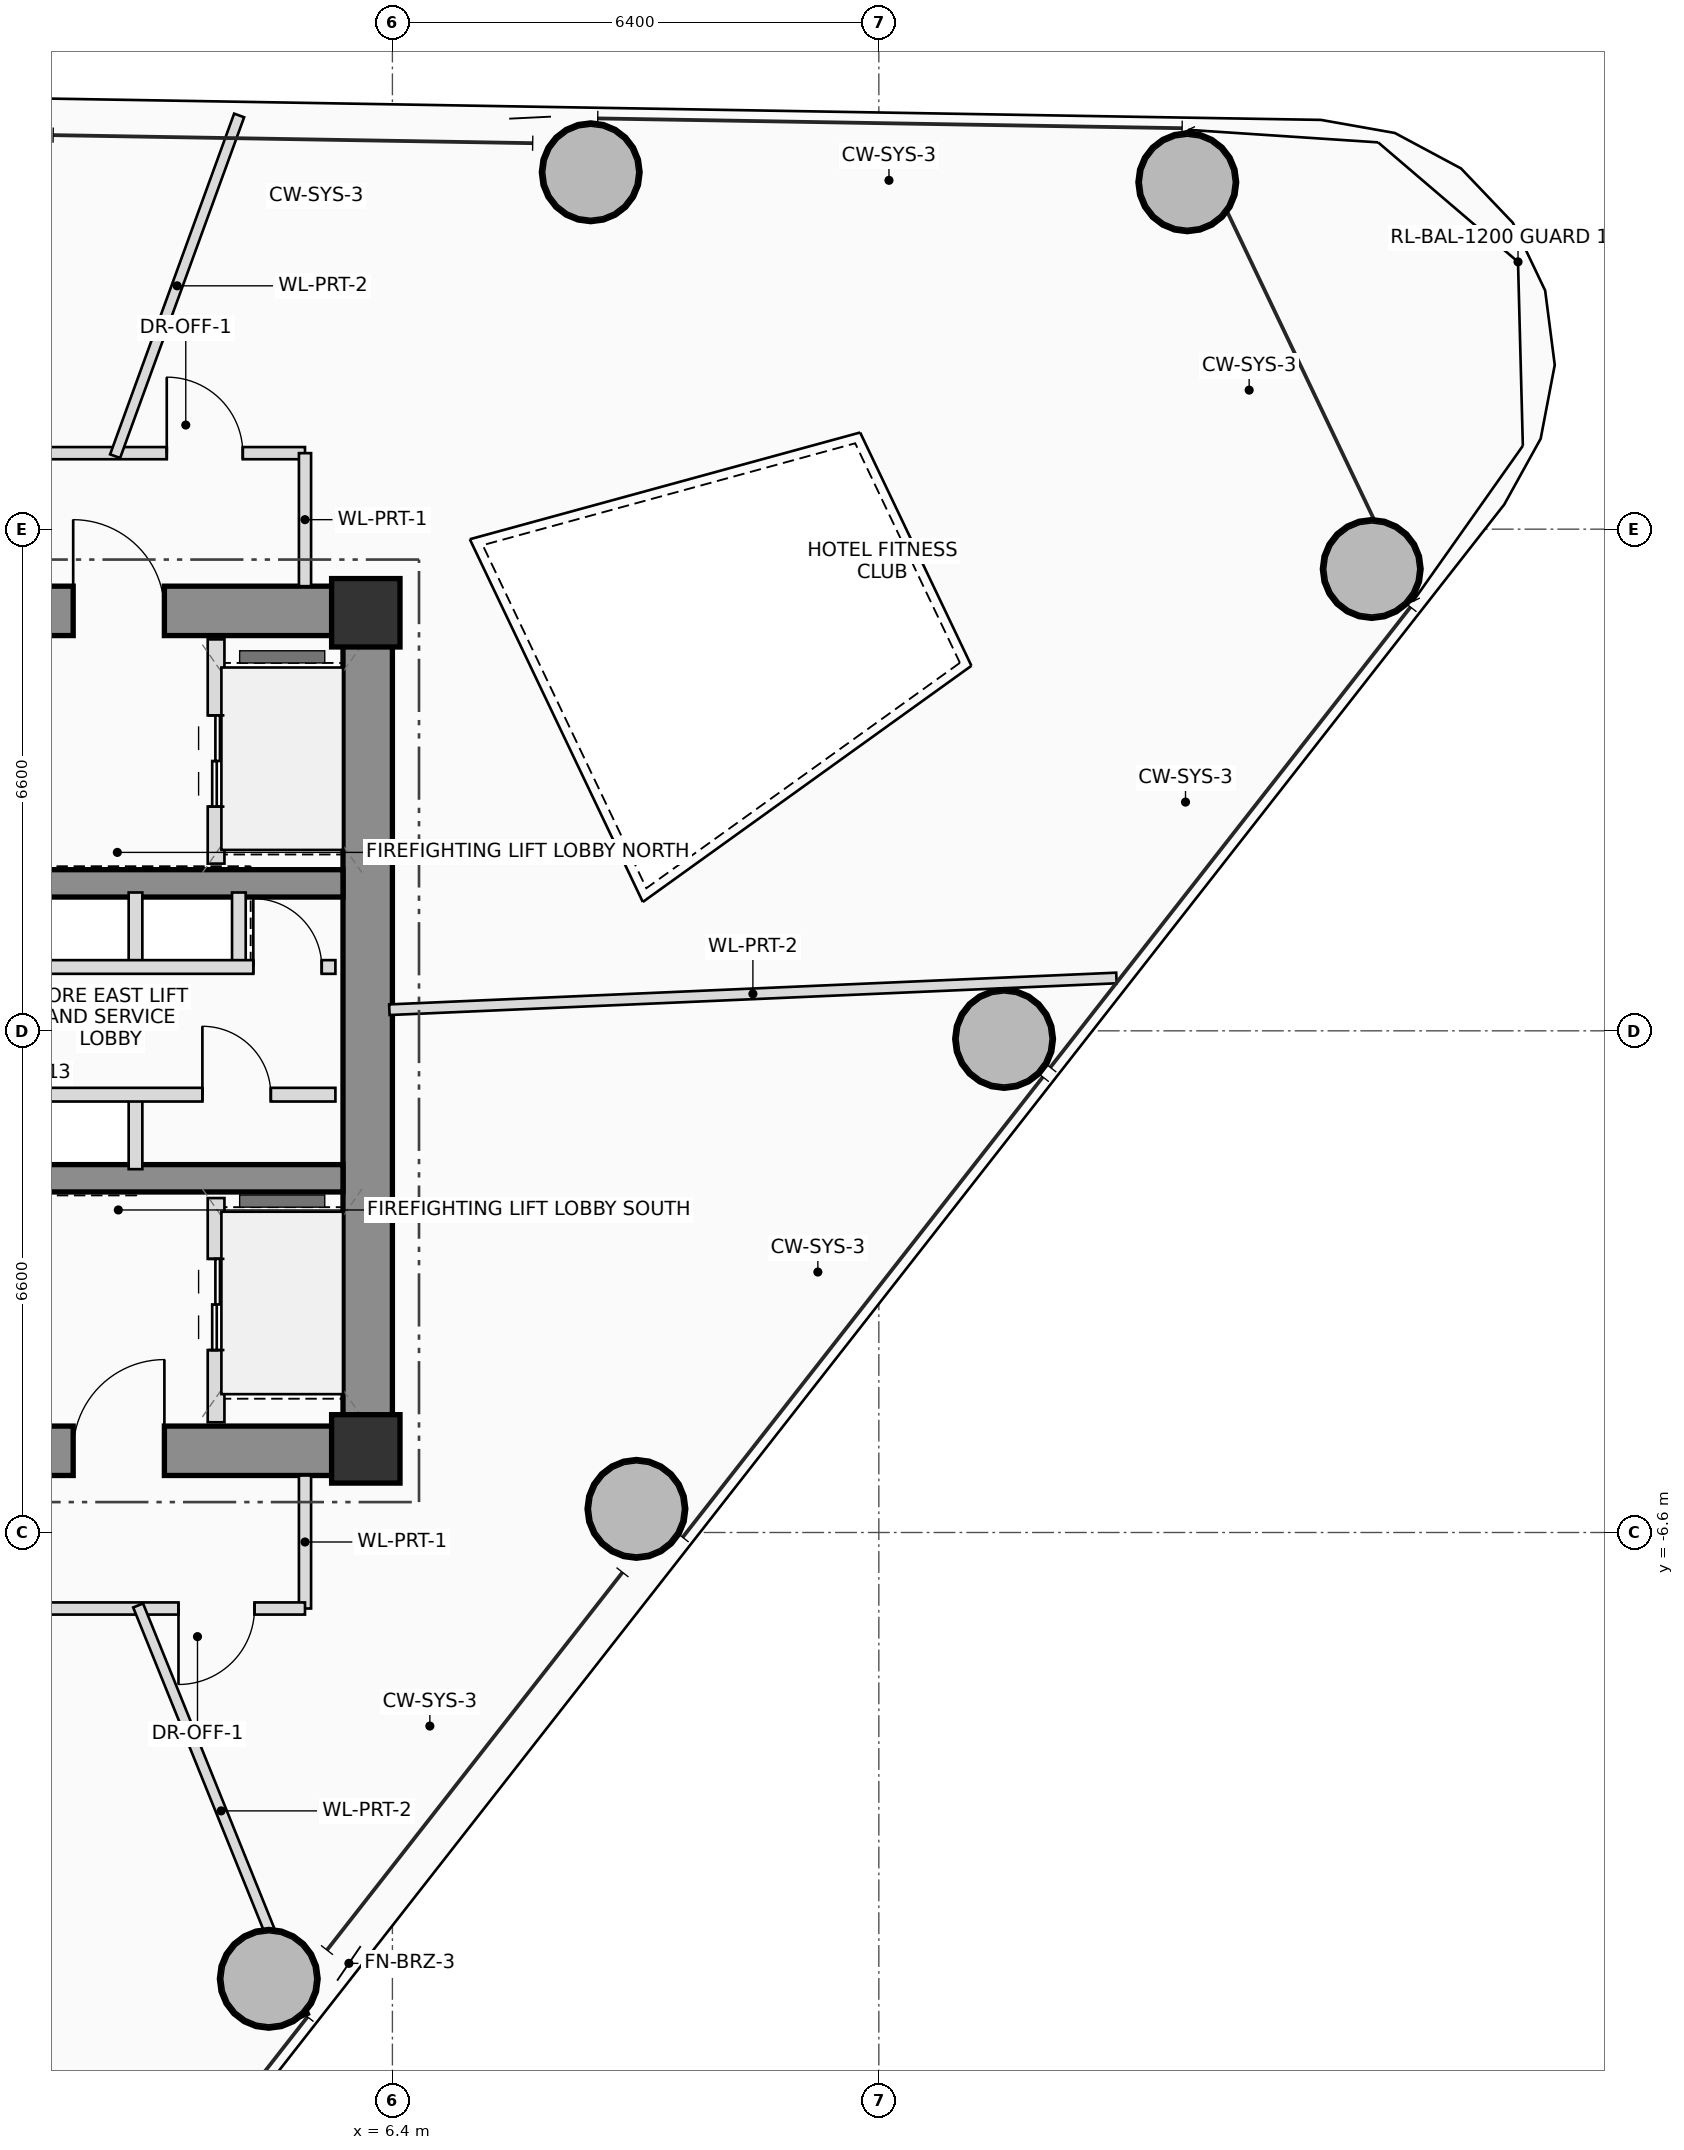
"""IFC4 building model, lengths in metres.
Left out: names, types, materials, properties, quantities, classifications, styles, units other than length and angle.
Written with IfcOpenShell. Run it as: python <this file> out.ifc"""

import sys

from ifc_helpers import new_model, si_unit, direction, frame, frame_2d, origin, origin_2d, place, context, subcontext, project, spatial, rectangle, hollow_circle, extrude, source, transform, mapped, element, fill, save


model = new_model("IFC4")
c1 = context("Model", 3, precision=1e-05, world=origin(), true_north=direction((0.0, 1.0)))
c2 = subcontext(c1, "Body", "Model", "MODEL_VIEW")
j1 = project(units=[si_unit("LENGTHUNIT", "METRE"), si_unit("PLANEANGLEUNIT", "RADIAN")], contexts=[c1])
p1 = place(None, origin())
s1 = spatial("IfcSite", under=j1, at=p1, CompositionType="ELEMENT")
p2 = place(p1, origin())
s2 = spatial("IfcBuilding", under=s1, at=p2, CompositionType="ELEMENT")
p3 = place(p2, frame((0.0, 0.0, 143.3)))
s3 = spatial("IfcBuildingStorey", under=s2, at=p3, CompositionType="ELEMENT", Elevation=143.3)
m1 = source(origin(), c2, "Body", "SweptSolid", [
    extrude(rectangle(XDim=0.9, YDim=0.9, at=origin_2d()), origin(), (0.0, 0.0, 1.0), 3.45),
])
for number, where, z_axis, x_axis in (
    (1, (6.05, -5.5, 0.0), (0.0, 0.0, 1.0), (1.0, 0.0, 0.0)),
    (2, (6.05, 5.5, 0.0), (0.0, 0.0, 1.0), (1.0, 0.0, 0.0)),
):
    element("IfcColumn", number, at=place(p3, frame(where, z_axis=z_axis, x_axis=x_axis)), inside=s3, PredefinedType="COLUMN", context=c2, shape_type="MappedRepresentation", body=[
        mapped(m1, transform((0.0, 0.0, 0.0), scale=1.0)),
    ])
p4 = place(p3, frame((-6.4, 5.525, 0.0), z_axis=(0.0, 0.0, 1.0), x_axis=(1.0, 0.0, 0.0)))
e3 = element("IfcWall", 3, at=p4, inside=s3, PredefinedType="SHEAR", context=c2, shape_type="SweptSolid", body=[
    extrude(rectangle(XDim=12.8, YDim=0.65, at=frame_2d((6.4, 0.0))), origin(), (0.0, 0.0, 1.0), 3.45),
])
p5 = place(p4, frame((8.6, 0.0, 0.0)))
e4 = element("IfcOpeningElement", 4, at=p5, cuts=e3, PredefinedType="OPENING", context=c2, shape_type="SweptSolid", body=[
    extrude(rectangle(XDim=1.2, YDim=2.2, at=frame_2d((0.6, 1.1))), frame((0.0, 0.335, 0.0), z_axis=(0.0, -1.0, 0.0), x_axis=(1.0, 0.0, 0.0)), (0.0, 0.0, 1.0), 0.67),
])
p6 = place(p3, frame((-6.4, -5.525, 0.0), z_axis=(0.0, 0.0, 1.0), x_axis=(1.0, 0.0, 0.0)))
e5 = element("IfcWall", 5, at=p6, inside=s3, PredefinedType="SHEAR", context=c2, shape_type="SweptSolid", body=[
    extrude(rectangle(XDim=12.8, YDim=0.65, at=frame_2d((6.4, 0.0))), origin(), (0.0, 0.0, 1.0), 3.45),
])
p7 = place(p6, frame((8.6, 0.0, 0.0)))
e6 = element("IfcOpeningElement", 6, at=p7, cuts=e5, PredefinedType="OPENING", context=c2, shape_type="SweptSolid", body=[
    extrude(rectangle(XDim=1.2, YDim=2.2, at=frame_2d((0.6, 1.1))), frame((0.0, 0.335, 0.0), z_axis=(0.0, -1.0, 0.0), x_axis=(1.0, 0.0, 0.0)), (0.0, 0.0, 1.0), 0.67),
])
p8 = place(p3, frame((6.075, -5.2, 0.0), z_axis=(0.0, 0.0, 1.0), x_axis=(0.0, 1.0, 0.0)))
e7 = element("IfcWall", 7, at=p8, inside=s3, PredefinedType="SHEAR", context=c2, shape_type="SweptSolid", body=[
    extrude(rectangle(XDim=10.4, YDim=0.65, at=frame_2d((5.2, 0.0))), origin(), (0.0, 0.0, 1.0), 3.45),
])
for number, where, z_axis, x_axis in (
    (8, (-5.75, 1.94, 0.0), (0.0, 0.0, 1.0), (1.0, 0.0, 0.0)),
    (9, (-5.75, -1.94, 0.0), (0.0, 0.0, 1.0), (1.0, 0.0, 0.0)),
):
    element("IfcWall", number, at=place(p3, frame(where, z_axis=z_axis, x_axis=x_axis)), inside=s3, PredefinedType="SHEAR", context=c2, shape_type="SweptSolid", body=[
        extrude(rectangle(XDim=11.5, YDim=0.36, at=frame_2d((5.75, 0.0))), origin(), (0.0, 0.0, 1.0), 3.45),
    ])
m2 = source(origin(), c2, "Body", "SweptSolid", [
    extrude(hollow_circle(Radius=0.65, WallThickness=0.045, at=origin_2d()), origin(), (0.0, 0.0, 1.0), 3.45),
])
for number, where, z_axis, x_axis in (
    (10, (4.773, -12.472, 0.0), (0.0, 0.0, 1.0), (1.0, 0.0, 0.0)),
    (11, (9.611, -6.289, 0.0), (0.0, 0.0, 1.0), (1.0, 0.0, 0.0)),
    (12, (14.448, -0.107, 0.0), (0.0, 0.0, 1.0), (1.0, 0.0, 0.0)),
    (13, (19.285, 6.076, 0.0), (0.0, 0.0, 1.0), (1.0, 0.0, 0.0)),
    (14, (16.858, 11.164, 0.0), (0.0, 0.0, 1.0), (1.0, 0.0, 0.0)),
    (15, (9.01, 11.295, 0.0), (0.0, 0.0, 1.0), (1.0, 0.0, 0.0)),
):
    element("IfcColumn", number, at=place(p3, frame(where, z_axis=z_axis, x_axis=x_axis)), inside=s3, PredefinedType="COLUMN", context=c2, shape_type="MappedRepresentation", body=[
        mapped(m2, transform((0.0, 0.0, 0.0), scale=1.0)),
    ])
p9 = place(p3, frame((4.08, 2.2, 0.0), z_axis=(0.0, 0.0, 1.0), x_axis=(0.0, 1.0, 0.0)))
e16 = element("IfcWall", 16, at=p9, inside=s3, PredefinedType="PLUMBINGWALL", context=c2, shape_type="SweptSolid", body=[
    extrude(rectangle(XDim=2.95, YDim=0.22, at=frame_2d((1.475, 0.0))), origin(), (0.0, 0.0, 1.0), 3.25),
])
p10 = place(p9, frame((0.75, 0.0, 0.0)))
e17 = element("IfcOpeningElement", 17, at=p10, cuts=e16, PredefinedType="OPENING", context=c2, shape_type="SweptSolid", body=[
    extrude(rectangle(XDim=1.2, YDim=2.25, at=frame_2d((0.6, 1.125))), frame((0.0, 0.12, 0.0), z_axis=(0.0, -1.0, 0.0), x_axis=(1.0, 0.0, 0.0)), (0.0, 0.0, 1.0), 0.24),
])
p11 = place(p3, frame((4.08, -5.15, 0.0), z_axis=(0.0, 0.0, 1.0), x_axis=(0.0, 1.0, 0.0)))
e18 = element("IfcWall", 18, at=p11, inside=s3, PredefinedType="PLUMBINGWALL", context=c2, shape_type="SweptSolid", body=[
    extrude(rectangle(XDim=2.95, YDim=0.22, at=frame_2d((1.475, 0.0))), origin(), (0.0, 0.0, 1.0), 3.25),
])
p12 = place(p11, frame((0.95, 0.0, 0.0)))
e19 = element("IfcOpeningElement", 19, at=p12, cuts=e18, PredefinedType="OPENING", context=c2, shape_type="SweptSolid", body=[
    extrude(rectangle(XDim=1.2, YDim=2.25, at=frame_2d((0.6, 1.125))), frame((0.0, 0.12, 0.0), z_axis=(0.0, -1.0, 0.0), x_axis=(1.0, 0.0, 0.0)), (0.0, 0.0, 1.0), 0.24),
])
for number, where, z_axis, x_axis in (
    (20, (3.02, 0.84, 0.0), (0.0, 0.0, 1.0), (0.0, 1.0, 0.0)),
    (21, (4.38, 0.84, 0.0), (0.0, 0.0, 1.0), (0.0, 1.0, 0.0)),
    (22, (3.02, -1.82, 0.0), (0.0, 0.0, 1.0), (0.0, 1.0, 0.0)),
):
    element("IfcWall", number, at=place(p3, frame(where, z_axis=z_axis, x_axis=x_axis)), inside=s3, PredefinedType="PLUMBINGWALL", context=c2, shape_type="SweptSolid", body=[
        extrude(rectangle(XDim=0.98, YDim=0.18, at=frame_2d((0.49, 0.0))), origin(), (0.0, 0.0, 1.0), 3.25),
    ])
p13 = place(p3, frame((-5.68, 0.84, 0.0), z_axis=(0.0, 0.0, 1.0), x_axis=(1.0, 0.0, 0.0)))
e23 = element("IfcWall", 23, at=p13, inside=s3, PredefinedType="PLUMBINGWALL", context=c2, shape_type="SweptSolid", body=[
    extrude(rectangle(XDim=11.33, YDim=0.18, at=frame_2d((5.665, 0.0))), origin(), (0.0, 0.0, 1.0), 3.25),
])
p14 = place(p13, frame((1.03, 0.0, 0.0)))
e24 = element("IfcOpeningElement", 24, at=p14, cuts=e23, PredefinedType="OPENING", context=c2, shape_type="SweptSolid", body=[
    extrude(rectangle(XDim=0.9, YDim=2.05, at=frame_2d((0.45, 1.025))), frame((0.0, 0.1, 0.0), z_axis=(0.0, -1.0, 0.0), x_axis=(1.0, 0.0, 0.0)), (0.0, 0.0, 1.0), 0.2),
])
p15 = place(p13, frame((3.93, 0.0, 0.0)))
e25 = element("IfcOpeningElement", 25, at=p15, cuts=e23, PredefinedType="OPENING", context=c2, shape_type="SweptSolid", body=[
    extrude(rectangle(XDim=1.1, YDim=2.2, at=frame_2d((0.55, 1.1))), frame((0.0, 0.1, 0.0), z_axis=(0.0, -1.0, 0.0), x_axis=(1.0, 0.0, 0.0)), (0.0, 0.0, 1.0), 0.2),
])
p16 = place(p13, frame((5.63, 0.0, 0.0)))
e26 = element("IfcOpeningElement", 26, at=p16, cuts=e23, PredefinedType="OPENING", context=c2, shape_type="SweptSolid", body=[
    extrude(rectangle(XDim=1.1, YDim=2.2, at=frame_2d((0.55, 1.1))), frame((0.0, 0.1, 0.0), z_axis=(0.0, -1.0, 0.0), x_axis=(1.0, 0.0, 0.0)), (0.0, 0.0, 1.0), 0.2),
])
p17 = place(p13, frame((10.25, 0.0, 0.0)))
e27 = element("IfcOpeningElement", 27, at=p17, cuts=e23, PredefinedType="OPENING", context=c2, shape_type="SweptSolid", body=[
    extrude(rectangle(XDim=0.9, YDim=2.05, at=frame_2d((0.45, 1.025))), frame((0.0, 0.1, 0.0), z_axis=(0.0, -1.0, 0.0), x_axis=(1.0, 0.0, 0.0)), (0.0, 0.0, 1.0), 0.2),
])
p18 = place(p3, frame((-5.68, -0.84, 0.0), z_axis=(0.0, 0.0, 1.0), x_axis=(1.0, 0.0, 0.0)))
e28 = element("IfcWall", 28, at=p18, inside=s3, PredefinedType="PLUMBINGWALL", context=c2, shape_type="SweptSolid", body=[
    extrude(rectangle(XDim=11.33, YDim=0.18, at=frame_2d((5.665, 0.0))), origin(), (0.0, 0.0, 1.0), 3.25),
])
p19 = place(p18, frame((1.73, 0.0, 0.0)))
e29 = element("IfcOpeningElement", 29, at=p19, cuts=e28, PredefinedType="OPENING", context=c2, shape_type="SweptSolid", body=[
    extrude(rectangle(XDim=0.9, YDim=2.05, at=frame_2d((0.45, 1.025))), frame((0.0, 0.1, 0.0), z_axis=(0.0, -1.0, 0.0), x_axis=(1.0, 0.0, 0.0)), (0.0, 0.0, 1.0), 0.2),
])
p20 = place(p18, frame((3.93, 0.0, 0.0)))
e30 = element("IfcOpeningElement", 30, at=p20, cuts=e28, PredefinedType="OPENING", context=c2, shape_type="SweptSolid", body=[
    extrude(rectangle(XDim=1.1, YDim=2.2, at=frame_2d((0.55, 1.1))), frame((0.0, 0.1, 0.0), z_axis=(0.0, -1.0, 0.0), x_axis=(1.0, 0.0, 0.0)), (0.0, 0.0, 1.0), 0.2),
])
p21 = place(p18, frame((5.63, 0.0, 0.0)))
e31 = element("IfcOpeningElement", 31, at=p21, cuts=e28, PredefinedType="OPENING", context=c2, shape_type="SweptSolid", body=[
    extrude(rectangle(XDim=1.1, YDim=2.2, at=frame_2d((0.55, 1.1))), frame((0.0, 0.1, 0.0), z_axis=(0.0, -1.0, 0.0), x_axis=(1.0, 0.0, 0.0)), (0.0, 0.0, 1.0), 0.2),
])
p22 = place(p18, frame((9.58, 0.0, 0.0)))
e32 = element("IfcOpeningElement", 32, at=p22, cuts=e28, PredefinedType="OPENING", context=c2, shape_type="SweptSolid", body=[
    extrude(rectangle(XDim=0.9, YDim=2.05, at=frame_2d((0.45, 1.025))), frame((0.0, 0.1, 0.0), z_axis=(0.0, -1.0, 0.0), x_axis=(1.0, 0.0, 0.0)), (0.0, 0.0, 1.0), 0.2),
])
p23 = place(p3, frame((-6.36, 7.6, 0.0), z_axis=(0.0, 0.0, 1.0), x_axis=(1.0, 0.0, 0.0)))
e33 = element("IfcWall", 33, at=p23, inside=s3, PredefinedType="PARTITIONING", context=c2, shape_type="SweptSolid", body=[
    extrude(rectangle(XDim=11.61, YDim=0.16, at=frame_2d((5.805, 0.0))), origin(), (0.0, 0.0, 1.0), 2.605),
])
p24 = place(p23, frame((4.501, 0.0, 0.0)))
e34 = element("IfcOpeningElement", 34, at=p24, cuts=e33, PredefinedType="OPENING", context=c2, shape_type="SweptSolid", body=[
    extrude(rectangle(XDim=1.05, YDim=2.2, at=frame_2d((0.525, 1.1))), frame((0.0, 0.09, 0.0), z_axis=(0.0, -1.0, 0.0), x_axis=(1.0, 0.0, 0.0)), (0.0, 0.0, 1.0), 0.18),
])
p25 = place(p23, frame((9.791, 0.0, 0.0)))
e35 = element("IfcOpeningElement", 35, at=p25, cuts=e33, PredefinedType="OPENING", context=c2, shape_type="SweptSolid", body=[
    extrude(rectangle(XDim=1.0, YDim=2.25, at=frame_2d((0.5, 1.125))), frame((0.0, 0.09, 0.0), z_axis=(0.0, -1.0, 0.0), x_axis=(1.0, 0.0, 0.0)), (0.0, 0.0, 1.0), 0.18),
])
p26 = place(p3, frame((5.25, 7.6, 0.0), z_axis=(0.0, 0.0, 1.0), x_axis=(0.0, -1.0, 0.0)))
e36 = element("IfcWall", 36, at=p26, inside=s3, PredefinedType="PARTITIONING", context=c2, shape_type="SweptSolid", body=[
    extrude(rectangle(XDim=1.75, YDim=0.16, at=frame_2d((0.875, 0.0))), origin(), (0.0, 0.0, 1.0), 2.605),
])
p27 = place(p3, frame((5.25, -5.85, 0.0), z_axis=(0.0, 0.0, 1.0), x_axis=(0.0, -1.0, 0.0)))
e37 = element("IfcWall", 37, at=p27, inside=s3, PredefinedType="PARTITIONING", context=c2, shape_type="SweptSolid", body=[
    extrude(rectangle(XDim=1.75, YDim=0.16, at=frame_2d((0.875, 0.0))), origin(), (0.0, 0.0, 1.0), 3.25),
])
p28 = place(p3, frame((5.25, -7.6, 0.0), z_axis=(0.0, 0.0, 1.0), x_axis=(-1.0, 0.0, 0.0)))
e38 = element("IfcWall", 38, at=p28, inside=s3, PredefinedType="PARTITIONING", context=c2, shape_type="SweptSolid", body=[
    extrude(rectangle(XDim=11.61, YDim=0.16, at=frame_2d((5.805, 0.0))), origin(), (0.0, 0.0, 1.0), 2.605),
])
p29 = place(p28, frame((0.665, 0.0, 0.0)))
e39 = element("IfcOpeningElement", 39, at=p29, cuts=e38, PredefinedType="OPENING", context=c2, shape_type="SweptSolid", body=[
    extrude(rectangle(XDim=1.0, YDim=2.25, at=frame_2d((0.5, 1.125))), frame((0.0, 0.09, 0.0), z_axis=(0.0, -1.0, 0.0), x_axis=(1.0, 0.0, 0.0)), (0.0, 0.0, 1.0), 0.18),
])
p30 = place(p28, frame((5.363, 0.0, 0.0)))
e40 = element("IfcOpeningElement", 40, at=p30, cuts=e38, PredefinedType="OPENING", context=c2, shape_type="SweptSolid", body=[
    extrude(rectangle(XDim=1.0, YDim=2.25, at=frame_2d((0.5, 1.125))), frame((0.0, 0.09, 0.0), z_axis=(0.0, -1.0, 0.0), x_axis=(1.0, 0.0, 0.0)), (0.0, 0.0, 1.0), 0.18),
])
p31 = place(p3, frame((6.36, 0.278, 0.0), z_axis=(0.0, 0.0, 1.0), x_axis=(0.999047913846, 0.043626435113, 0.0)))
e41 = element("IfcWall", 41, at=p31, inside=s3, PredefinedType="PARTITIONING", context=c2, shape_type="SweptSolid", body=[
    extrude(rectangle(XDim=9.575, YDim=0.14, at=frame_2d((4.788, 0.0))), origin(), (0.0, 0.0, 1.0), 2.605),
])
p32 = place(p3, frame((2.752, 7.56, 0.0), z_axis=(0.0, 0.0, 1.0), x_axis=(0.342010136434, 0.939696262936, 0.0)))
e42 = element("IfcWall", 42, at=p32, inside=s3, PredefinedType="PARTITIONING", context=c2, shape_type="SweptSolid", body=[
    extrude(rectangle(XDim=4.771, YDim=0.14, at=frame_2d((2.385, 0.0))), origin(), (0.0, 0.0, 1.0), 2.605),
])
p33 = place(p3, frame((3.054, -7.56, 0.0), z_axis=(0.0, 0.0, 1.0), x_axis=(0.374616076071, -0.927180023269, 0.0)))
e43 = element("IfcWall", 43, at=p33, inside=s3, PredefinedType="PARTITIONING", context=c2, shape_type="SweptSolid", body=[
    extrude(rectangle(XDim=5.83, YDim=0.14, at=frame_2d((2.915, 0.0))), origin(), (0.0, 0.0, 1.0), 2.605),
])
p34 = place(p5, origin())
e44 = element("IfcDoor", 44, at=p34, inside=s3, OperationType="SINGLE_SWING_LEFT", PredefinedType="DOOR", context=c2, shape_type="SweptSolid", body=[
    extrude(rectangle(XDim=1.2, YDim=2.2, at=frame_2d((0.6, 1.1))), frame((0.0, 0.025, 0.0), z_axis=(0.0, -1.0, 0.0), x_axis=(1.0, 0.0, 0.0)), (0.0, 0.0, 1.0), 0.05),
])
fill(e4, e44)
p35 = place(p7, origin())
e45 = element("IfcDoor", 45, at=p35, inside=s3, OperationType="SINGLE_SWING_RIGHT", PredefinedType="DOOR", context=c2, shape_type="SweptSolid", body=[
    extrude(rectangle(XDim=1.2, YDim=2.2, at=frame_2d((0.6, 1.1))), frame((0.0, 0.025, 0.0), z_axis=(0.0, -1.0, 0.0), x_axis=(1.0, 0.0, 0.0)), (0.0, 0.0, 1.0), 0.05),
])
fill(e6, e45)
p36 = place(p10, origin())
e46 = element("IfcDoor", 46, at=p36, inside=s3, OperationType="DOUBLE_DOOR_SLIDING", PredefinedType="DOOR", context=c2, shape_type="SweptSolid", body=[
    extrude(rectangle(XDim=1.2, YDim=2.25, at=frame_2d((0.6, 1.125))), frame((0.0, 0.025, 0.0), z_axis=(0.0, -1.0, 0.0), x_axis=(1.0, 0.0, 0.0)), (0.0, 0.0, 1.0), 0.05),
])
fill(e17, e46)
p37 = place(p12, origin())
e47 = element("IfcDoor", 47, at=p37, inside=s3, OperationType="DOUBLE_DOOR_SLIDING", PredefinedType="DOOR", context=c2, shape_type="SweptSolid", body=[
    extrude(rectangle(XDim=1.2, YDim=2.25, at=frame_2d((0.6, 1.125))), frame((0.0, 0.025, 0.0), z_axis=(0.0, -1.0, 0.0), x_axis=(1.0, 0.0, 0.0)), (0.0, 0.0, 1.0), 0.05),
])
fill(e19, e47)
p38 = place(p17, origin())
e48 = element("IfcDoor", 48, at=p38, inside=s3, OperationType="SINGLE_SWING_LEFT", PredefinedType="DOOR", context=c2, shape_type="SweptSolid", body=[
    extrude(rectangle(XDim=0.9, YDim=2.05, at=frame_2d((0.45, 1.025))), frame((0.0, 0.025, 0.0), z_axis=(0.0, -1.0, 0.0), x_axis=(1.0, 0.0, 0.0)), (0.0, 0.0, 1.0), 0.05),
])
fill(e27, e48)
p39 = place(p22, origin())
e49 = element("IfcDoor", 49, at=p39, inside=s3, OperationType="SINGLE_SWING_LEFT", PredefinedType="DOOR", context=c2, shape_type="SweptSolid", body=[
    extrude(rectangle(XDim=0.9, YDim=2.05, at=frame_2d((0.45, 1.025))), frame((0.0, 0.025, 0.0), z_axis=(0.0, -1.0, 0.0), x_axis=(1.0, 0.0, 0.0)), (0.0, 0.0, 1.0), 0.05),
])
fill(e32, e49)
p40 = place(p25, origin())
e50 = element("IfcDoor", 50, at=p40, inside=s3, OperationType="SINGLE_SWING_LEFT", PredefinedType="DOOR", context=c2, shape_type="SweptSolid", body=[
    extrude(rectangle(XDim=1.0, YDim=2.25, at=frame_2d((0.5, 1.125))), frame((0.0, 0.025, 0.0), z_axis=(0.0, -1.0, 0.0), x_axis=(1.0, 0.0, 0.0)), (0.0, 0.0, 1.0), 0.05),
])
fill(e35, e50)
p41 = place(p29, origin())
e51 = element("IfcDoor", 51, at=p41, inside=s3, OperationType="SINGLE_SWING_RIGHT", PredefinedType="DOOR", context=c2, shape_type="SweptSolid", body=[
    extrude(rectangle(XDim=1.0, YDim=2.25, at=frame_2d((0.5, 1.125))), frame((0.0, 0.025, 0.0), z_axis=(0.0, -1.0, 0.0), x_axis=(1.0, 0.0, 0.0)), (0.0, 0.0, 1.0), 0.05),
])
fill(e39, e51)
save(model, sys.argv[1])
